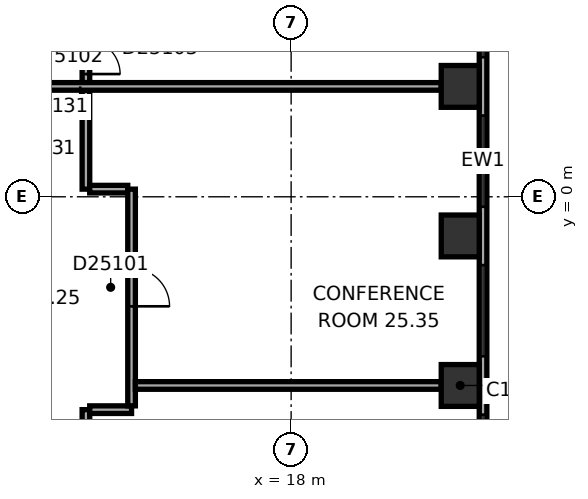
"""IFC4 building model, lengths in metres.
Left out: names, types, materials, properties, quantities, classifications, styles, units other than length and angle.
Written with IfcOpenShell. Run it as: python <this file> out.ifc"""

import sys

from ifc_helpers import new_model, si_unit, direction, frame, frame_2d, origin, origin_2d, place, context, subcontext, project, spatial, rectangle, extrude, element, fill, save


model = new_model("IFC4")
c1 = context("Model", 3, precision=1e-05, world=origin(), true_north=direction((0.0, 1.0)))
c2 = subcontext(c1, "Body", "Model", "MODEL_VIEW")
j1 = project(units=[si_unit("LENGTHUNIT", "METRE"), si_unit("PLANEANGLEUNIT", "RADIAN")], contexts=[c1])
p1 = place(None, origin())
s1 = spatial("IfcSite", under=j1, at=p1, CompositionType="ELEMENT")
p2 = place(p1, origin())
s2 = spatial("IfcBuilding", under=s1, at=p2, CompositionType="ELEMENT")
p3 = place(p2, frame((0.0, 0.0, 106.7)))
s3 = spatial("IfcBuildingStorey", under=s2, at=p3, CompositionType="ELEMENT", Elevation=106.7)
for number, where, z_axis, x_axis in (
    (1, (22.45, -4.965, 0.0), (0.0, 0.0, 1.0), (0.0, 1.0, 0.0)),
    (2, (22.45, -1.03, 0.0), (0.0, 0.0, 1.0), (0.0, 1.0, 0.0)),
    (3, (22.45, 2.905, 0.0), (0.0, 0.0, 1.0), (0.0, 1.0, 0.0)),
):
    element("IfcColumn", number, at=place(p3, frame(where, z_axis=z_axis, x_axis=x_axis)), inside=s3, PredefinedType="COLUMN", context=c2, shape_type="SweptSolid", body=[
        extrude(rectangle(XDim=1.1, YDim=1.0, at=origin_2d()), origin(), (0.0, 0.0, 1.0), 3.3),
    ])
p4 = place(p3, frame((23.05, -9.687, 0.0), z_axis=(0.0, 0.0, 1.0), x_axis=(0.0, 1.0, 0.0)))
e4 = element("IfcWall", 4, at=p4, inside=s3, PredefinedType="STANDARD", context=c2, shape_type="SweptSolid", body=[
    extrude(rectangle(XDim=21.246, YDim=0.2, at=frame_2d((10.623, 0.0))), origin(), (0.0, 0.0, 1.0), 3.3),
])
p5 = place(p4, frame((1.555, 0.0, 0.8)))
e5 = element("IfcOpeningElement", 5, at=p5, cuts=e4, PredefinedType="OPENING", context=c2, shape_type="SweptSolid", body=[
    extrude(rectangle(XDim=2.4, YDim=1.7, at=frame_2d((1.2, 0.85))), frame((0.0, 0.11, 0.0), z_axis=(0.0, -1.0, 0.0), x_axis=(1.0, 0.0, 0.0)), (0.0, 0.0, 1.0), 0.22),
])
p6 = place(p4, frame((5.489, 0.0, 0.8)))
e6 = element("IfcOpeningElement", 6, at=p6, cuts=e4, PredefinedType="OPENING", context=c2, shape_type="SweptSolid", body=[
    extrude(rectangle(XDim=2.4, YDim=1.7, at=frame_2d((1.2, 0.85))), frame((0.0, 0.11, 0.0), z_axis=(0.0, -1.0, 0.0), x_axis=(1.0, 0.0, 0.0)), (0.0, 0.0, 1.0), 0.22),
])
p7 = place(p4, frame((9.424, 0.0, 0.8)))
e7 = element("IfcOpeningElement", 7, at=p7, cuts=e4, PredefinedType="OPENING", context=c2, shape_type="SweptSolid", body=[
    extrude(rectangle(XDim=2.4, YDim=1.7, at=frame_2d((1.2, 0.85))), frame((0.0, 0.11, 0.0), z_axis=(0.0, -1.0, 0.0), x_axis=(1.0, 0.0, 0.0)), (0.0, 0.0, 1.0), 0.22),
])
p8 = place(p4, frame((13.358, 0.0, 0.8)))
e8 = element("IfcOpeningElement", 8, at=p8, cuts=e4, PredefinedType="OPENING", context=c2, shape_type="SweptSolid", body=[
    extrude(rectangle(XDim=2.4, YDim=1.7, at=frame_2d((1.2, 0.85))), frame((0.0, 0.11, 0.0), z_axis=(0.0, -1.0, 0.0), x_axis=(1.0, 0.0, 0.0)), (0.0, 0.0, 1.0), 0.22),
])
p9 = place(p4, frame((17.293, 0.0, 0.8)))
e9 = element("IfcOpeningElement", 9, at=p9, cuts=e4, PredefinedType="OPENING", context=c2, shape_type="SweptSolid", body=[
    extrude(rectangle(XDim=2.4, YDim=1.7, at=frame_2d((1.2, 0.85))), frame((0.0, 0.11, 0.0), z_axis=(0.0, -1.0, 0.0), x_axis=(1.0, 0.0, 0.0)), (0.0, 0.0, 1.0), 0.22),
])
p10 = place(p3, frame((12.6, -6.138, 0.0), z_axis=(0.0, 0.0, 1.0), x_axis=(0.0, 1.0, 0.0)))
e10 = element("IfcWall", 10, at=p10, inside=s3, PredefinedType="PARTITIONING", context=c2, shape_type="SweptSolid", body=[
    extrude(rectangle(XDim=0.537, YDim=0.2, at=frame_2d((0.268, 0.0))), origin(), (0.0, 0.0, 1.0), 3.05),
])
p11 = place(p3, frame((12.6, 0.201, 0.0), z_axis=(0.0, 0.0, 1.0), x_axis=(0.0, 1.0, 0.0)))
e11 = element("IfcWall", 11, at=p11, inside=s3, PredefinedType="PARTITIONING", context=c2, shape_type="SweptSolid", body=[
    extrude(rectangle(XDim=2.604, YDim=0.2, at=frame_2d((1.302, 0.0))), origin(), (0.0, 0.0, 1.0), 3.05),
])
p12 = place(p3, frame((12.6, 3.004, 0.0), z_axis=(0.0, 0.0, 1.0), x_axis=(0.0, 1.0, 0.0)))
e12 = element("IfcWall", 12, at=p12, inside=s3, PredefinedType="PARTITIONING", context=c2, shape_type="SweptSolid", body=[
    extrude(rectangle(XDim=3.173, YDim=0.2, at=frame_2d((1.586, 0.0))), origin(), (0.0, 0.0, 1.0), 3.05),
])
p13 = place(p12, frame((0.225, 0.0, 0.0)))
e13 = element("IfcOpeningElement", 13, at=p13, cuts=e12, PredefinedType="OPENING", context=c2, shape_type="SweptSolid", body=[
    extrude(rectangle(XDim=0.9, YDim=2.1, at=frame_2d((0.45, 1.05))), frame((0.0, 0.11, 0.0), z_axis=(0.0, -1.0, 0.0), x_axis=(1.0, 0.0, 0.0)), (0.0, 0.0, 1.0), 0.22),
])
p14 = place(p3, frame((12.7, -5.601, 0.0), z_axis=(0.0, 0.0, 1.0), x_axis=(1.0, 0.0, 0.0)))
e14 = element("IfcWall", 14, at=p14, inside=s3, PredefinedType="PARTITIONING", context=c2, shape_type="SweptSolid", body=[
    extrude(rectangle(XDim=1.101, YDim=0.2, at=frame_2d((0.551, 0.0))), origin(), (0.0, 0.0, 1.0), 3.05),
])
p15 = place(p3, frame((13.701, 0.201, 0.0), z_axis=(0.0, 0.0, 1.0), x_axis=(-1.0, 0.0, 0.0)))
e15 = element("IfcWall", 15, at=p15, inside=s3, PredefinedType="PARTITIONING", context=c2, shape_type="SweptSolid", body=[
    extrude(rectangle(XDim=1.001, YDim=0.2, at=frame_2d((0.5, 0.0))), origin(), (0.0, 0.0, 1.0), 3.05),
])
p16 = place(p3, frame((13.801, -5.501, 0.0), z_axis=(0.0, 0.0, 1.0), x_axis=(0.0, 1.0, 0.0)))
e16 = element("IfcWall", 16, at=p16, inside=s3, PredefinedType="PARTITIONING", context=c2, shape_type="SweptSolid", body=[
    extrude(rectangle(XDim=5.702, YDim=0.2, at=frame_2d((2.851, 0.0))), origin(), (0.0, 0.0, 1.0), 3.05),
])
p17 = place(p16, frame((2.619, 0.0, 0.0)))
e17 = element("IfcOpeningElement", 17, at=p17, cuts=e16, PredefinedType="OPENING", context=c2, shape_type="SweptSolid", body=[
    extrude(rectangle(XDim=1.0, YDim=2.1, at=frame_2d((0.5, 1.05))), frame((0.0, 0.11, 0.0), z_axis=(0.0, -1.0, 0.0), x_axis=(1.0, 0.0, 0.0)), (0.0, 0.0, 1.0), 0.22),
])
p18 = place(p3, frame((13.901, -4.965, 0.0), z_axis=(0.0, 0.0, 1.0), x_axis=(1.0, 0.0, 0.0)))
e18 = element("IfcWall", 18, at=p18, inside=s3, PredefinedType="PARTITIONING", context=c2, shape_type="SweptSolid", body=[
    extrude(rectangle(XDim=8.049, YDim=0.2, at=frame_2d((4.024, 0.0))), origin(), (0.0, 0.0, 1.0), 3.05),
])
p19 = place(p3, frame((21.95, 2.905, 0.0), z_axis=(0.0, 0.0, 1.0), x_axis=(-1.0, 0.0, 0.0)))
e19 = element("IfcWall", 19, at=p19, inside=s3, PredefinedType="PARTITIONING", context=c2, shape_type="SweptSolid", body=[
    extrude(rectangle(XDim=11.25, YDim=0.2, at=frame_2d((5.625, 0.0))), origin(), (0.0, 0.0, 1.0), 3.05),
])
p20 = place(p19, frame((9.5, 0.0, 0.0)))
e20 = element("IfcOpeningElement", 20, at=p20, cuts=e19, PredefinedType="OPENING", context=c2, shape_type="SweptSolid", body=[
    extrude(rectangle(XDim=1.6, YDim=2.1, at=frame_2d((0.8, 1.05))), frame((0.0, 0.11, 0.0), z_axis=(0.0, -1.0, 0.0), x_axis=(1.0, 0.0, 0.0)), (0.0, 0.0, 1.0), 0.22),
])
p21 = place(p5, origin())
e21 = element("IfcWindow", 21, at=p21, inside=s3, PartitioningType="SINGLE_PANEL", PredefinedType="WINDOW", context=c2, shape_type="SweptSolid", body=[
    extrude(rectangle(XDim=2.4, YDim=1.7, at=frame_2d((1.2, 0.85))), frame((0.0, 0.03, 0.0), z_axis=(0.0, -1.0, 0.0), x_axis=(1.0, 0.0, 0.0)), (0.0, 0.0, 1.0), 0.06),
])
fill(e5, e21)
p22 = place(p6, origin())
e22 = element("IfcWindow", 22, at=p22, inside=s3, PartitioningType="SINGLE_PANEL", PredefinedType="WINDOW", context=c2, shape_type="SweptSolid", body=[
    extrude(rectangle(XDim=2.4, YDim=1.7, at=frame_2d((1.2, 0.85))), frame((0.0, 0.03, 0.0), z_axis=(0.0, -1.0, 0.0), x_axis=(1.0, 0.0, 0.0)), (0.0, 0.0, 1.0), 0.06),
])
fill(e6, e22)
p23 = place(p7, origin())
e23 = element("IfcWindow", 23, at=p23, inside=s3, PartitioningType="SINGLE_PANEL", PredefinedType="WINDOW", context=c2, shape_type="SweptSolid", body=[
    extrude(rectangle(XDim=2.4, YDim=1.7, at=frame_2d((1.2, 0.85))), frame((0.0, 0.03, 0.0), z_axis=(0.0, -1.0, 0.0), x_axis=(1.0, 0.0, 0.0)), (0.0, 0.0, 1.0), 0.06),
])
fill(e7, e23)
p24 = place(p8, origin())
e24 = element("IfcWindow", 24, at=p24, inside=s3, PartitioningType="SINGLE_PANEL", PredefinedType="WINDOW", context=c2, shape_type="SweptSolid", body=[
    extrude(rectangle(XDim=2.4, YDim=1.7, at=frame_2d((1.2, 0.85))), frame((0.0, 0.03, 0.0), z_axis=(0.0, -1.0, 0.0), x_axis=(1.0, 0.0, 0.0)), (0.0, 0.0, 1.0), 0.06),
])
fill(e8, e24)
p25 = place(p17, origin())
e25 = element("IfcDoor", 25, at=p25, inside=s3, OperationType="SINGLE_SWING_LEFT", PredefinedType="DOOR", context=c2, shape_type="SweptSolid", body=[
    extrude(rectangle(XDim=1.0, YDim=2.1, at=frame_2d((0.5, 1.05))), frame((0.0, 0.025, 0.0), z_axis=(0.0, -1.0, 0.0), x_axis=(1.0, 0.0, 0.0)), (0.0, 0.0, 1.0), 0.05),
])
fill(e17, e25)
p26 = place(p13, origin())
e26 = element("IfcDoor", 26, at=p26, inside=s3, OperationType="SINGLE_SWING_LEFT", PredefinedType="DOOR", context=c2, shape_type="SweptSolid", body=[
    extrude(rectangle(XDim=0.9, YDim=2.1, at=frame_2d((0.45, 1.05))), frame((0.0, 0.025, 0.0), z_axis=(0.0, -1.0, 0.0), x_axis=(1.0, 0.0, 0.0)), (0.0, 0.0, 1.0), 0.05),
])
fill(e13, e26)
p27 = place(p20, origin())
e27 = element("IfcDoor", 27, at=p27, inside=s3, OperationType="DOUBLE_DOOR_SINGLE_SWING", PredefinedType="DOOR", context=c2, shape_type="SweptSolid", body=[
    extrude(rectangle(XDim=1.6, YDim=2.1, at=frame_2d((0.8, 1.05))), frame((0.0, 0.025, 0.0), z_axis=(0.0, -1.0, 0.0), x_axis=(1.0, 0.0, 0.0)), (0.0, 0.0, 1.0), 0.05),
])
fill(e20, e27)
save(model, sys.argv[1])
